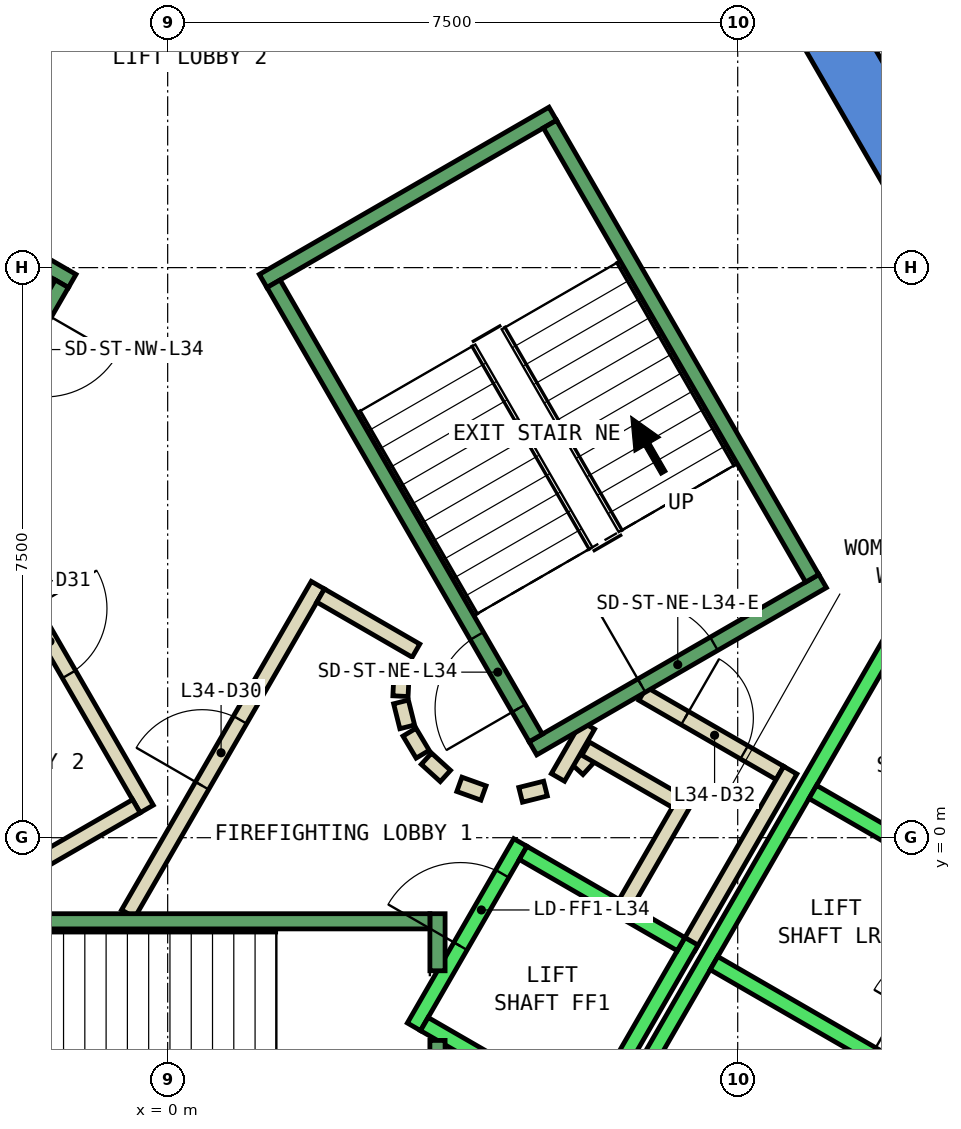
"""IFC4 building model, lengths in metres.
Left out: names, types, materials, properties, quantities, classifications, styles, units other than length and angle.
Written with IfcOpenShell. Run it as: python <this file> out.ifc"""

import sys

from ifc_helpers import new_model, si_unit, direction, frame, frame_2d, origin, place, context, subcontext, project, spatial, polyline, rectangle, outline, extrude, element, fill, save


model = new_model("IFC4")
c1 = context("Model", 3, precision=1e-05, world=origin(), true_north=direction((0.0, 1.0)))
c2 = subcontext(c1, "Body", "Model", "MODEL_VIEW")
j1 = project(units=[si_unit("LENGTHUNIT", "METRE"), si_unit("PLANEANGLEUNIT", "RADIAN")], contexts=[c1])
p1 = place(None, origin())
s1 = spatial("IfcSite", under=j1, at=p1, CompositionType="ELEMENT")
p2 = place(p1, origin())
s2 = spatial("IfcBuilding", under=s1, at=p2, CompositionType="ELEMENT")
p3 = place(p2, frame((0.0, 0.0, 155.0)))
s3 = spatial("IfcBuildingStorey", under=s2, at=p3, CompositionType="ELEMENT", Elevation=155.0)
p4 = place(p3, frame((0.0, 0.0, -0.4)))
e1 = element("IfcWall", 1, at=p4, inside=s3, PredefinedType="SHEAR", context=c2, shape_type="SweptSolid", body=[
    extrude(outline(polyline([(8.517, 11.748), (7.824, 11.348), (12.933, 2.5), (13.856, 2.5), (8.517, 11.748)])), origin(), (0.0, 0.0, 1.0), 4.2),
])
p5 = place(p3, frame((0.0, 0.0, -0.4)))
e2 = element("IfcWall", 2, at=p5, inside=s3, PredefinedType="SHEAR", context=c2, shape_type="SweptSolid", body=[
    extrude(outline(polyline([(10.717, -2.937), (10.025, -2.537), (9.374, -3.663), (10.067, -4.063), (10.717, -2.937)])), origin(), (0.0, 0.0, 1.0), 4.2),
])
p6 = place(p3, frame((5.39, 0.898, 0.0), z_axis=(0.0, 0.0, 1.0), x_axis=(0.673828488714, 0.738887791073, 0.0)))
e3 = element("IfcWall", 3, at=p6, inside=s3, PredefinedType="PARTITIONING", context=c2, shape_type="SweptSolid", body=[
    extrude(rectangle(XDim=0.263, YDim=0.2, at=frame_2d((0.131, 0.0))), origin(), (0.0, 0.0, 1.0), 3.8),
])
p7 = place(p3, frame((5.499, 1.172, 0.0), z_axis=(0.0, 0.0, 1.0), x_axis=(0.866333505267, -0.499465972466, 0.0)))
e4 = element("IfcWall", 4, at=p7, inside=s3, PredefinedType="PARTITIONING", context=c2, shape_type="SweptSolid", body=[
    extrude(rectangle(XDim=1.374, YDim=0.2, at=frame_2d((0.687, 0.0))), origin(), (0.0, 0.0, 1.0), 3.8),
])
p8 = place(p3, frame((6.826, 0.522, 0.0), z_axis=(0.0, 0.0, 1.0), x_axis=(-0.500016722714, -0.866015748706, 0.0)))
e5 = element("IfcWall", 5, at=p8, inside=s3, PredefinedType="PARTITIONING", context=c2, shape_type="SweptSolid", body=[
    extrude(rectangle(XDim=1.7, YDim=0.2, at=frame_2d((0.85, 0.0))), origin(), (0.0, 0.0, 1.0), 3.8),
])
p9 = place(p3, frame((6.25, 1.894, 0.0), z_axis=(0.0, 0.0, 1.0), x_axis=(0.866043184279, -0.499969202016, 0.0)))
e6 = element("IfcWall", 6, at=p9, inside=s3, PredefinedType="PARTITIONING", context=c2, shape_type="SweptSolid", body=[
    extrude(rectangle(XDim=2.084, YDim=0.2, at=frame_2d((1.042, 0.0))), origin(), (0.0, 0.0, 1.0), 3.8),
])
p10 = place(p9, frame((0.642, 0.0, 0.0)))
e7 = element("IfcOpeningElement", 7, at=p10, cuts=e6, PredefinedType="OPENING", context=c2, shape_type="SweptSolid", body=[
    extrude(rectangle(XDim=0.9, YDim=2.1, at=frame_2d((0.45, 1.05))), frame((0.0, 0.11, 0.0), z_axis=(0.0, -1.0, 0.0), x_axis=(1.0, 0.0, 0.0)), (0.0, 0.0, 1.0), 0.22),
])
p11 = place(p3, frame((8.192, 0.888, 0.0), z_axis=(0.0, 0.0, 1.0), x_axis=(-0.499940625693, -0.866059680843, 0.0)))
e8 = element("IfcWall", 8, at=p11, inside=s3, PredefinedType="PARTITIONING", context=c2, shape_type="SweptSolid", body=[
    extrude(rectangle(XDim=2.68, YDim=0.2, at=frame_2d((1.34, 0.0))), origin(), (0.0, 0.0, 1.0), 3.8),
])
p12 = place(p3, frame((5.135, 0.793, 0.0), z_axis=(0.0, 0.0, 1.0), x_axis=(0.499526442893, 0.866298639529, 0.0)))
e9 = element("IfcWall", 9, at=p12, inside=s3, PredefinedType="PARTITIONING", context=c2, shape_type="SweptSolid", body=[
    extrude(rectangle(XDim=0.791, YDim=0.2, at=frame_2d((0.396, 0.0))), origin(), (0.0, 0.0, 1.0), 3.8),
])
p13 = place(p3, frame((-0.52, -1.0, 0.0), z_axis=(0.0, 0.0, 1.0), x_axis=(0.50011622646, 0.865958290007, 0.0)))
e10 = element("IfcWall", 10, at=p13, inside=s3, PredefinedType="PARTITIONING", context=c2, shape_type="SweptSolid", body=[
    extrude(rectangle(XDim=4.991, YDim=0.2, at=frame_2d((2.496, 0.0))), origin(), (0.0, 0.0, 1.0), 3.8),
])
p14 = place(p13, frame((1.945, 0.0, 0.0)))
e11 = element("IfcOpeningElement", 11, at=p14, cuts=e10, PredefinedType="OPENING", context=c2, shape_type="SweptSolid", body=[
    extrude(rectangle(XDim=1.0, YDim=2.1, at=frame_2d((0.5, 1.05))), frame((0.0, 0.11, 0.0), z_axis=(0.0, -1.0, 0.0), x_axis=(1.0, 0.0, 0.0)), (0.0, 0.0, 1.0), 0.22),
])
p15 = place(p3, frame((2.012, 3.186, 0.0), z_axis=(0.0, 0.0, 1.0), x_axis=(0.865891012941, -0.500232699559, 0.0)))
e12 = element("IfcWall", 12, at=p15, inside=s3, PredefinedType="PARTITIONING", context=c2, shape_type="SweptSolid", body=[
    extrude(rectangle(XDim=1.449, YDim=0.2, at=frame_2d((0.725, 0.0))), origin(), (0.0, 0.0, 1.0), 3.8),
])
p16 = place(p3, frame((3.079, 2.199, 0.0), z_axis=(0.0, 0.0, 1.0), x_axis=(-0.047771483479, -0.998858290933, 0.0)))
e13 = element("IfcWall", 13, at=p16, inside=s3, PredefinedType="PARTITIONING", context=c2, shape_type="SweptSolid", body=[
    extrude(rectangle(XDim=0.337, YDim=0.2, at=frame_2d((0.169, 0.0))), origin(), (0.0, 0.0, 1.0), 3.8),
])
p17 = place(p3, frame((3.07, 1.786, 0.0), z_axis=(0.0, 0.0, 1.0), x_axis=(0.242705583207, -0.970099994784, 0.0)))
e14 = element("IfcWall", 14, at=p17, inside=s3, PredefinedType="PARTITIONING", context=c2, shape_type="SweptSolid", body=[
    extrude(rectangle(XDim=0.338, YDim=0.2, at=frame_2d((0.169, 0.0))), origin(), (0.0, 0.0, 1.0), 3.8),
])
for number, where, z_axis, x_axis in (
    (15, (3.182, 1.388, 0.0), (0.0, 0.0, 1.0), (0.512, -0.859, 0.0)),
    (16, (3.404, 1.039, 0.0), (0.0, 0.0, 1.0), (0.74, -0.672, 0.0)),
):
    element("IfcWall", number, at=place(p3, frame(where, z_axis=z_axis, x_axis=x_axis)), inside=s3, PredefinedType="PARTITIONING", context=c2, shape_type="SweptSolid", body=[
        extrude(rectangle(XDim=0.338, YDim=0.2, at=frame_2d((0.169, 0.0))), origin(), (0.0, 0.0, 1.0), 3.8),
    ])
p18 = place(p3, frame((3.838, 0.702, 0.0), z_axis=(0.0, 0.0, 1.0), x_axis=(0.941035081519, -0.338308993895, 0.0)))
e17 = element("IfcWall", 17, at=p18, inside=s3, PredefinedType="PARTITIONING", context=c2, shape_type="SweptSolid", body=[
    extrude(rectangle(XDim=0.337, YDim=0.2, at=frame_2d((0.168, 0.0))), origin(), (0.0, 0.0, 1.0), 3.8),
])
p19 = place(p3, frame((4.644, 0.564, 0.0), z_axis=(0.0, 0.0, 1.0), x_axis=(0.969929076366, 0.243387729394, 0.0)))
e18 = element("IfcWall", 18, at=p19, inside=s3, PredefinedType="PARTITIONING", context=c2, shape_type="SweptSolid", body=[
    extrude(rectangle(XDim=0.337, YDim=0.2, at=frame_2d((0.168, 0.0))), origin(), (0.0, 0.0, 1.0), 3.8),
])
p20 = place(p3, frame((-2.771, 4.7, 0.0), z_axis=(0.0, 0.0, 1.0), x_axis=(0.499969479948, -0.866043023828, 0.0)))
e19 = element("IfcWall", 19, at=p20, inside=s3, PredefinedType="PARTITIONING", context=c2, shape_type="SweptSolid", body=[
    extrude(rectangle(XDim=4.99, YDim=0.2, at=frame_2d((2.495, 0.0))), origin(), (0.0, 0.0, 1.0), 3.8),
])
p21 = place(p20, frame((1.945, 0.0, 0.0)))
e20 = element("IfcOpeningElement", 20, at=p21, cuts=e19, PredefinedType="OPENING", context=c2, shape_type="SweptSolid", body=[
    extrude(rectangle(XDim=1.0, YDim=2.1, at=frame_2d((0.5, 1.05))), frame((0.0, 0.11, 0.0), z_axis=(0.0, -1.0, 0.0), x_axis=(1.0, 0.0, 0.0)), (0.0, 0.0, 1.0), 0.22),
])
p22 = place(p3, frame((-0.412, 0.414, 0.0), z_axis=(0.0, 0.0, 1.0), x_axis=(-0.866017369001, -0.500013916395, 0.0)))
e21 = element("IfcWall", 21, at=p22, inside=s3, PredefinedType="PARTITIONING", context=c2, shape_type="SweptSolid", body=[
    extrude(rectangle(XDim=1.45, YDim=0.2, at=frame_2d((0.725, 0.0))), origin(), (0.0, 0.0, 1.0), 3.8),
])
p23 = place(p3, frame((3.24, -2.488, 0.0), z_axis=(0.0, 0.0, 1.0), x_axis=(0.49994636267, 0.866056369097, 0.0)))
e22 = element("IfcWall", 22, at=p23, inside=s3, PredefinedType="STANDARD", context=c2, shape_type="SweptSolid", body=[
    extrude(rectangle(XDim=2.8, YDim=0.2, at=frame_2d((1.4, 0.0))), origin(), (0.0, 0.0, 1.0), 3.8),
])
p24 = place(p23, frame((1.225, 0.0, 0.0)))
e23 = element("IfcOpeningElement", 23, at=p24, cuts=e22, PredefinedType="OPENING", context=c2, shape_type="SweptSolid", body=[
    extrude(rectangle(XDim=1.1, YDim=2.1, at=frame_2d((0.55, 1.05))), frame((0.0, 0.11, 0.0), z_axis=(0.0, -1.0, 0.0), x_axis=(1.0, 0.0, 0.0)), (0.0, 0.0, 1.0), 0.22),
])
p25 = place(p3, frame((5.492, -3.788, 0.0), z_axis=(0.0, 0.0, 1.0), x_axis=(0.500011755427, 0.866018616679, 0.0)))
e24 = element("IfcWall", 24, at=p25, inside=s3, PredefinedType="STANDARD", context=c2, shape_type="SweptSolid", body=[
    extrude(rectangle(XDim=2.8, YDim=0.2, at=frame_2d((1.4, 0.0))), origin(), (0.0, 0.0, 1.0), 3.8),
])
p26 = place(p3, frame((3.377, -2.452, 0.0), z_axis=(0.0, 0.0, 1.0), x_axis=(0.865955154139, -0.50012165622, 0.0)))
e25 = element("IfcWall", 25, at=p26, inside=s3, PredefinedType="STANDARD", context=c2, shape_type="SweptSolid", body=[
    extrude(rectangle(XDim=2.4, YDim=0.2, at=frame_2d((1.2, 0.0))), origin(), (0.0, 0.0, 1.0), 3.8),
])
p27 = place(p3, frame((4.677, -0.2, 0.0), z_axis=(0.0, 0.0, 1.0), x_axis=(0.865973769406, -0.500089422704, 0.0)))
e26 = element("IfcWall", 26, at=p27, inside=s3, PredefinedType="STANDARD", context=c2, shape_type="SweptSolid", body=[
    extrude(rectangle(XDim=2.399, YDim=0.2, at=frame_2d((1.2, 0.0))), origin(), (0.0, 0.0, 1.0), 3.8),
])
p28 = place(p3, frame((4.451, -6.19, 0.0), z_axis=(0.0, 0.0, 1.0), x_axis=(0.50000090737, 0.866024879913, 0.0)))
e27 = element("IfcWall", 27, at=p28, inside=s3, PredefinedType="STANDARD", context=c2, shape_type="SweptSolid", body=[
    extrude(rectangle(XDim=10.6, YDim=0.2, at=frame_2d((5.3, 0.0))), origin(), (0.0, 0.0, 1.0), 3.8),
])
for number, where, z_axis, x_axis in (
    (28, (7.188, -1.65, 0.0), (0.0, 0.0, 1.0), (0.866, -0.5, 0.0)),
    (29, (8.488, 0.602, 0.0), (0.0, 0.0, 1.0), (0.866, -0.5, 0.0)),
):
    element("IfcWall", number, at=place(p3, frame(where, z_axis=z_axis, x_axis=x_axis)), inside=s3, PredefinedType="STANDARD", context=c2, shape_type="SweptSolid", body=[
        extrude(rectangle(XDim=2.5, YDim=0.2, at=frame_2d((1.25, 0.0))), origin(), (0.0, 0.0, 1.0), 3.8),
    ])
p29 = place(p3, frame((3.55, -2.667, 0.0), z_axis=(0.0, 0.0, 1.0), x_axis=(0.0, -1.0, 0.0)))
e30 = element("IfcWall", 30, at=p29, inside=s3, PredefinedType="STANDARD", context=c2, shape_type="SweptSolid", body=[
    extrude(rectangle(XDim=2.733, YDim=0.2, at=frame_2d((1.366, 0.0))), origin(), (0.0, 0.0, 1.0), 3.8),
])
p30 = place(p3, frame((3.55, -1.0, 0.0), z_axis=(0.0, 0.0, 1.0), x_axis=(0.0, -1.0, 0.0)))
e31 = element("IfcWall", 31, at=p30, inside=s3, PredefinedType="STANDARD", context=c2, shape_type="SweptSolid", body=[
    extrude(rectangle(XDim=0.751, YDim=0.2, at=frame_2d((0.375, 0.0))), origin(), (0.0, 0.0, 1.0), 3.8),
])
p31 = place(p3, frame((-3.45, -1.1, 0.0), z_axis=(0.0, 0.0, 1.0), x_axis=(1.0, 0.0, 0.0)))
e32 = element("IfcWall", 32, at=p31, inside=s3, PredefinedType="STANDARD", context=c2, shape_type="SweptSolid", body=[
    extrude(rectangle(XDim=6.9, YDim=0.2, at=frame_2d((3.45, 0.0))), origin(), (0.0, 0.0, 1.0), 3.8),
])
p32 = place(p31, frame((0.45, 0.0, 0.0)))
e33 = element("IfcOpeningElement", 33, at=p32, cuts=e32, PredefinedType="OPENING", context=c2, shape_type="SweptSolid", body=[
    extrude(rectangle(XDim=1.1, YDim=2.2, at=frame_2d((0.55, 1.1))), frame((0.0, 0.11, 0.0), z_axis=(0.0, -1.0, 0.0), x_axis=(1.0, 0.0, 0.0)), (0.0, 0.0, 1.0), 0.22),
])
p33 = place(p3, frame((4.806, 1.176, 0.0), z_axis=(0.0, 0.0, 1.0), x_axis=(0.866059941101, 0.499940174841, 0.0)))
e34 = element("IfcWall", 34, at=p33, inside=s3, PredefinedType="STANDARD", context=c2, shape_type="SweptSolid", body=[
    extrude(rectangle(XDim=4.4, YDim=0.2, at=frame_2d((2.2, 0.0))), origin(), (0.0, 0.0, 1.0), 3.8),
])
p34 = place(p33, frame((1.65, 0.0, 0.0)))
e35 = element("IfcOpeningElement", 35, at=p34, cuts=e34, PredefinedType="OPENING", context=c2, shape_type="SweptSolid", body=[
    extrude(rectangle(XDim=1.1, YDim=2.2, at=frame_2d((0.55, 1.1))), frame((0.0, 0.11, 0.0), z_axis=(0.0, -1.0, 0.0), x_axis=(1.0, 0.0, 0.0)), (0.0, 0.0, 1.0), 0.22),
])
p35 = place(p3, frame((1.256, 7.324, 0.0), z_axis=(0.0, 0.0, 1.0), x_axis=(0.866046073146, 0.499964197906, 0.0)))
e36 = element("IfcWall", 36, at=p35, inside=s3, PredefinedType="STANDARD", context=c2, shape_type="SweptSolid", body=[
    extrude(rectangle(XDim=4.4, YDim=0.2, at=frame_2d((2.2, 0.0))), origin(), (0.0, 0.0, 1.0), 3.8),
])
p36 = place(p3, frame((4.843, 1.312, 0.0), z_axis=(0.0, 0.0, 1.0), x_axis=(-0.499963383562, 0.866046543262, 0.0)))
e37 = element("IfcWall", 37, at=p36, inside=s3, PredefinedType="STANDARD", context=c2, shape_type="SweptSolid", body=[
    extrude(rectangle(XDim=6.9, YDim=0.2, at=frame_2d((3.45, 0.0))), origin(), (0.0, 0.0, 1.0), 3.8),
])
p37 = place(p36, frame((0.45, 0.0, 0.0)))
e38 = element("IfcOpeningElement", 38, at=p37, cuts=e37, PredefinedType="OPENING", context=c2, shape_type="SweptSolid", body=[
    extrude(rectangle(XDim=1.1, YDim=2.2, at=frame_2d((0.55, 1.1))), frame((0.0, 0.11, 0.0), z_axis=(0.0, -1.0, 0.0), x_axis=(1.0, 0.0, 0.0)), (0.0, 0.0, 1.0), 0.22),
])
p38 = place(p3, frame((8.48, 3.412, 0.0), z_axis=(0.0, 0.0, 1.0), x_axis=(-0.499978703459, 0.866037698999, 0.0)))
e39 = element("IfcWall", 39, at=p38, inside=s3, PredefinedType="STANDARD", context=c2, shape_type="SweptSolid", body=[
    extrude(rectangle(XDim=6.9, YDim=0.2, at=frame_2d((3.45, 0.0))), origin(), (0.0, 0.0, 1.0), 3.8),
])
p39 = place(p3, frame((-1.256, 7.324, 0.0), z_axis=(0.0, 0.0, 1.0), x_axis=(-0.866046073146, 0.499964197906, 0.0)))
e40 = element("IfcWall", 40, at=p39, inside=s3, PredefinedType="STANDARD", context=c2, shape_type="SweptSolid", body=[
    extrude(rectangle(XDim=4.4, YDim=0.2, at=frame_2d((2.2, 0.0))), origin(), (0.0, 0.0, 1.0), 3.8),
])
p40 = place(p39, frame((1.65, 0.0, 0.0)))
e41 = element("IfcOpeningElement", 41, at=p40, cuts=e40, PredefinedType="OPENING", context=c2, shape_type="SweptSolid", body=[
    extrude(rectangle(XDim=1.1, YDim=2.2, at=frame_2d((0.55, 1.1))), frame((0.0, 0.11, 0.0), z_axis=(0.0, -1.0, 0.0), x_axis=(1.0, 0.0, 0.0)), (0.0, 0.0, 1.0), 0.22),
])
p41 = place(p3, frame((-1.393, 7.288, 0.0), z_axis=(0.0, 0.0, 1.0), x_axis=(-0.499963383562, -0.866046543262, 0.0)))
e42 = element("IfcWall", 42, at=p41, inside=s3, PredefinedType="STANDARD", context=c2, shape_type="SweptSolid", body=[
    extrude(rectangle(XDim=6.9, YDim=0.2, at=frame_2d((3.45, 0.0))), origin(), (0.0, 0.0, 1.0), 3.8),
])
p42 = place(p41, frame((0.45, 0.0, 0.0)))
e43 = element("IfcOpeningElement", 43, at=p42, cuts=e42, PredefinedType="OPENING", context=c2, shape_type="SweptSolid", body=[
    extrude(rectangle(XDim=1.1, YDim=2.2, at=frame_2d((0.55, 1.1))), frame((0.0, 0.11, 0.0), z_axis=(0.0, -1.0, 0.0), x_axis=(1.0, 0.0, 0.0)), (0.0, 0.0, 1.0), 0.22),
])
p43 = place(p14, origin())
e44 = element("IfcDoor", 44, at=p43, inside=s3, OperationType="SINGLE_SWING_LEFT", PredefinedType="DOOR", context=c2, shape_type="SweptSolid", body=[
    extrude(rectangle(XDim=1.0, YDim=2.1, at=frame_2d((0.5, 1.05))), frame((0.0, 0.025, 0.0), z_axis=(0.0, -1.0, 0.0), x_axis=(1.0, 0.0, 0.0)), (0.0, 0.0, 1.0), 0.05),
])
fill(e11, e44)
p44 = place(p21, origin())
e45 = element("IfcDoor", 45, at=p44, inside=s3, OperationType="SINGLE_SWING_RIGHT", PredefinedType="DOOR", context=c2, shape_type="SweptSolid", body=[
    extrude(rectangle(XDim=1.0, YDim=2.1, at=frame_2d((0.5, 1.05))), frame((0.0, 0.025, 0.0), z_axis=(0.0, -1.0, 0.0), x_axis=(1.0, 0.0, 0.0)), (0.0, 0.0, 1.0), 0.05),
])
fill(e20, e45)
p45 = place(p10, origin())
e46 = element("IfcDoor", 46, at=p45, inside=s3, OperationType="SINGLE_SWING_LEFT", PredefinedType="DOOR", context=c2, shape_type="SweptSolid", body=[
    extrude(rectangle(XDim=0.9, YDim=2.1, at=frame_2d((0.45, 1.05))), frame((0.0, 0.025, 0.0), z_axis=(0.0, -1.0, 0.0), x_axis=(1.0, 0.0, 0.0)), (0.0, 0.0, 1.0), 0.05),
])
fill(e7, e46)
p46 = place(p24, origin())
e47 = element("IfcDoor", 47, at=p46, inside=s3, OperationType="SLIDING_TO_LEFT", PredefinedType="DOOR", context=c2, shape_type="SweptSolid", body=[
    extrude(rectangle(XDim=1.1, YDim=2.1, at=frame_2d((0.55, 1.05))), frame((0.0, 0.025, 0.0), z_axis=(0.0, -1.0, 0.0), x_axis=(1.0, 0.0, 0.0)), (0.0, 0.0, 1.0), 0.05),
])
fill(e23, e47)
p47 = place(p37, origin())
e48 = element("IfcDoor", 48, at=p47, inside=s3, OperationType="SINGLE_SWING_LEFT", PredefinedType="DOOR", context=c2, shape_type="SweptSolid", body=[
    extrude(rectangle(XDim=1.1, YDim=2.2, at=frame_2d((0.55, 1.1))), frame((0.0, 0.025, 0.0), z_axis=(0.0, -1.0, 0.0), x_axis=(1.0, 0.0, 0.0)), (0.0, 0.0, 1.0), 0.05),
])
fill(e38, e48)
p48 = place(p34, origin())
e49 = element("IfcDoor", 49, at=p48, inside=s3, OperationType="SINGLE_SWING_LEFT", PredefinedType="DOOR", context=c2, shape_type="SweptSolid", body=[
    extrude(rectangle(XDim=1.1, YDim=2.2, at=frame_2d((0.55, 1.1))), frame((0.0, 0.025, 0.0), z_axis=(0.0, -1.0, 0.0), x_axis=(1.0, 0.0, 0.0)), (0.0, 0.0, 1.0), 0.05),
])
fill(e35, e49)
save(model, sys.argv[1])
